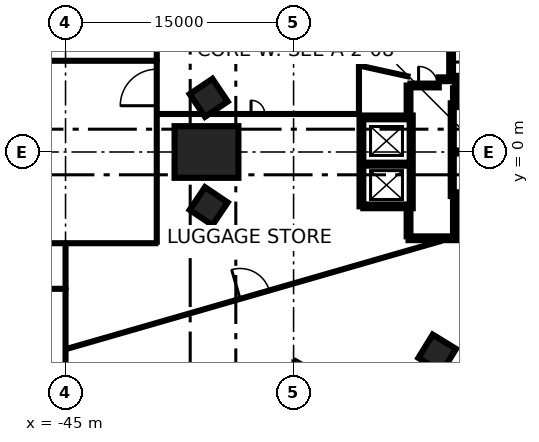
"""IFC4 building model, lengths in metres.
Left out: names, types, materials, properties, quantities, classifications, styles, units other than length and angle.
Written with IfcOpenShell. Run it as: python <this file> out.ifc"""

import sys

from ifc_helpers import new_model, si_unit, direction, frame, frame_2d, origin, origin_2d, place, context, subcontext, project, spatial, rectangle, extrude, element, fill, save


model = new_model("IFC4")
c1 = context("Model", 3, precision=1e-05, world=origin(), true_north=direction((0.0, 1.0)))
c2 = subcontext(c1, "Body", "Model", "MODEL_VIEW")
j1 = project(units=[si_unit("LENGTHUNIT", "METRE"), si_unit("PLANEANGLEUNIT", "RADIAN")], contexts=[c1])
p1 = place(None, origin())
s1 = spatial("IfcSite", under=j1, at=p1, CompositionType="ELEMENT")
p2 = place(p1, origin())
s2 = spatial("IfcBuilding", under=s1, at=p2, CompositionType="ELEMENT")
p3 = place(p2, origin())
s3 = spatial("IfcBuildingStorey", under=s2, at=p3, CompositionType="ELEMENT", Elevation=0.0)
p4 = place(p3, frame((-35.729, 0.0, -0.45), z_axis=(0.0, 0.0, 1.0), x_axis=(1.0, 0.0, 0.0)))
e1 = element("IfcColumn", 1, at=p4, inside=s3, PredefinedType="COLUMN", context=c2, shape_type="SweptSolid", body=[
    extrude(rectangle(XDim=4.2, YDim=3.4, at=origin_2d()), origin(), (0.0, 0.0, 1.0), 7.55),
])
for number, where, z_axis, x_axis in (
    (2, (-35.583, 3.565, -0.45), (0.0, 0.0, 1.0), (-0.559, 0.829, 0.0)),
    (3, (-35.583, -3.565, -0.45), (0.0, 0.0, 1.0), (0.559, 0.829, 0.0)),
    (4, (-20.552, -13.248, -0.45), (0.0, 0.0, 1.0), (0.523, 0.852, 0.0)),
):
    element("IfcColumn", number, at=place(p3, frame(where, z_axis=z_axis, x_axis=x_axis)), inside=s3, PredefinedType="COLUMN", context=c2, shape_type="SweptSolid", body=[
        extrude(rectangle(XDim=1.8, YDim=1.8, at=origin_2d()), origin(), (0.0, 0.0, 1.0), 5.15),
    ])
p5 = place(p3, frame((-25.983, -16.031, 0.0), z_axis=(0.0, 0.0, 1.0), x_axis=(-0.866023543838, 0.500003221507, 0.0)))
e5 = element("IfcWall", 5, at=p5, inside=s3, PredefinedType="SOLIDWALL", context=c2, shape_type="SweptSolid", body=[
    extrude(rectangle(XDim=4.566, YDim=0.25, at=frame_2d((2.283, 0.0))), origin(), (0.0, 0.0, 1.0), 7.1),
])
p6 = place(p3, frame((-16.187, -5.675, 0.0), z_axis=(0.0, 0.0, 1.0), x_axis=(-1.0, 0.0, 0.0)))
e6 = element("IfcWall", 6, at=p6, inside=s3, PredefinedType="SHEAR", context=c2, shape_type="SweptSolid", body=[
    extrude(rectangle(XDim=6.25, YDim=0.25, at=frame_2d((3.125, 0.0))), origin(), (0.0, 0.0, 1.0), 7.1),
])
p7 = place(p3, frame((-25.537, -3.575, 0.0), z_axis=(0.0, 0.0, 1.0), x_axis=(0.0, 1.0, 0.0)))
e7 = element("IfcWall", 7, at=p7, inside=s3, PredefinedType="SHEAR", context=c2, shape_type="SweptSolid", body=[
    extrude(rectangle(XDim=5.85, YDim=0.25, at=frame_2d((2.925, 0.0))), origin(), (0.0, 0.0, 1.0), 7.1),
])
p8 = place(p3, frame((-19.387, 3.075, 0.0), z_axis=(0.0, 0.0, 1.0), x_axis=(1.0, 0.0, 0.0)))
e8 = element("IfcWall", 8, at=p8, inside=s3, PredefinedType="SHEAR", context=c2, shape_type="SweptSolid", body=[
    extrude(rectangle(XDim=3.2, YDim=0.25, at=frame_2d((1.6, 0.0))), origin(), (0.0, 0.0, 1.0), 7.1),
])
for number, where, z_axis, x_axis in (
    (9, (-22.437, -3.575, 0.0), (0.0, 0.0, 1.0), (-1.0, 0.0, 0.0)),
    (10, (-25.412, 2.275, 0.0), (0.0, 0.0, 1.0), (1.0, 0.0, 0.0)),
):
    element("IfcWall", number, at=place(p3, frame(where, z_axis=z_axis, x_axis=x_axis)), inside=s3, PredefinedType="SHEAR", context=c2, shape_type="SweptSolid", body=[
        extrude(rectangle(XDim=2.975, YDim=0.25, at=frame_2d((1.487, 0.0))), origin(), (0.0, 0.0, 1.0), 7.1),
    ])
p9 = place(p3, frame((-19.637, 4.785, 0.0), z_axis=(0.0, 0.0, 1.0), x_axis=(0.0, 1.0, 0.0)))
e11 = element("IfcWall", 11, at=p9, inside=s3, PredefinedType="SHEAR", context=c2, shape_type="SweptSolid", body=[
    extrude(rectangle(XDim=2.865, YDim=0.25, at=frame_2d((1.432, 0.0))), origin(), (0.0, 0.0, 1.0), 7.1),
])
p10 = place(p3, frame((-16.302, 4.315, 0.0), z_axis=(0.0, 0.0, 1.0), x_axis=(-1.0, 0.0, 0.0)))
e12 = element("IfcWall", 12, at=p10, inside=s3, PredefinedType="SHEAR", context=c2, shape_type="SweptSolid", body=[
    extrude(rectangle(XDim=3.085, YDim=0.25, at=frame_2d((1.542, 0.0))), origin(), (0.0, 0.0, 1.0), 7.1),
])
p11 = place(p3, frame((-22.437, 2.4, 0.0), z_axis=(0.0, 0.0, 1.0), x_axis=(0.0, 1.0, 0.0)))
e13 = element("IfcWall", 13, at=p11, inside=s3, PredefinedType="SHEAR", context=c2, shape_type="SweptSolid", body=[
    extrude(rectangle(XDim=1.975, YDim=0.25, at=frame_2d((0.987, 0.0))), origin(), (0.0, 0.0, 1.0), 7.1),
])
p12 = place(p3, frame((-22.437, -5.55, 0.0), z_axis=(0.0, 0.0, 1.0), x_axis=(0.0, 1.0, 0.0)))
e14 = element("IfcWall", 14, at=p12, inside=s3, PredefinedType="SHEAR", context=c2, shape_type="SweptSolid", body=[
    extrude(rectangle(XDim=1.849, YDim=0.25, at=frame_2d((0.925, 0.0))), origin(), (0.0, 0.0, 1.0), 7.1),
])
p13 = place(p3, frame((-22.312, 4.375, 0.0), z_axis=(0.0, 0.0, 1.0), x_axis=(1.0, 0.0, 0.0)))
e15 = element("IfcWall", 15, at=p13, inside=s3, PredefinedType="SHEAR", context=c2, shape_type="SweptSolid", body=[
    extrude(rectangle(XDim=1.865, YDim=0.25, at=frame_2d((0.932, 0.0))), origin(), (0.0, 0.0, 1.0), 7.1),
])
p14 = place(p13, frame((0.535, 0.0, 0.0)))
e16 = element("IfcOpeningElement", 16, at=p14, cuts=e15, PredefinedType="OPENING", context=c2, shape_type="SweptSolid", body=[
    extrude(rectangle(XDim=1.25, YDim=2.1, at=frame_2d((0.625, 1.05))), frame((0.0, 0.135, 0.0), z_axis=(0.0, -1.0, 0.0), x_axis=(1.0, 0.0, 0.0)), (0.0, 0.0, 1.0), 0.27),
])
p15 = place(p3, frame((-19.387, 4.19, 0.0), z_axis=(0.0, 0.0, 1.0), x_axis=(0.0, -1.0, 0.0)))
e17 = element("IfcWall", 17, at=p15, inside=s3, PredefinedType="SHEAR", context=c2, shape_type="SweptSolid", body=[
    extrude(rectangle(XDim=0.989, YDim=0.25, at=frame_2d((0.495, 0.0))), origin(), (0.0, 0.0, 1.0), 7.1),
])
p16 = place(p3, frame((-20.447, 4.785, 0.0), z_axis=(0.0, 0.0, 1.0), x_axis=(1.0, 0.0, 0.0)))
e18 = element("IfcWall", 18, at=p16, inside=s3, PredefinedType="SHEAR", context=c2, shape_type="SweptSolid", body=[
    extrude(rectangle(XDim=0.685, YDim=0.25, at=frame_2d((0.342, 0.0))), origin(), (0.0, 0.0, 1.0), 7.1),
])
p17 = place(p3, frame((-19.562, -2.9, 0.0), z_axis=(0.0, 0.0, 1.0), x_axis=(0.0, 1.0, 0.0)))
e19 = element("IfcWall", 19, at=p17, inside=s3, PredefinedType="SHEAR", context=c2, shape_type="SweptSolid", body=[
    extrude(rectangle(XDim=6.1, YDim=0.2, at=frame_2d((3.05, 0.0))), origin(), (0.0, 0.0, 1.0), 7.1),
])
p18 = place(p17, frame((3.95, 0.0, 0.0)))
e20 = element("IfcOpeningElement", 20, at=p18, cuts=e19, PredefinedType="OPENING", context=c2, shape_type="SweptSolid", body=[
    extrude(rectangle(XDim=1.1, YDim=2.1, at=frame_2d((0.55, 1.05))), frame((0.0, 0.11, 0.0), z_axis=(0.0, -1.0, 0.0), x_axis=(1.0, 0.0, 0.0)), (0.0, 0.0, 1.0), 0.22),
])
p19 = place(p17, frame((0.968, 0.0, 0.0)))
e21 = element("IfcOpeningElement", 21, at=p19, cuts=e19, PredefinedType="OPENING", context=c2, shape_type="SweptSolid", body=[
    extrude(rectangle(XDim=1.1, YDim=2.1, at=frame_2d((0.55, 1.05))), frame((0.0, 0.11, 0.0), z_axis=(0.0, -1.0, 0.0), x_axis=(1.0, 0.0, 0.0)), (0.0, 0.0, 1.0), 0.22),
])
p20 = place(p3, frame((-22.262, 2.4, 0.0), z_axis=(0.0, 0.0, 1.0), x_axis=(0.0, -1.0, 0.0)))
e22 = element("IfcWall", 22, at=p20, inside=s3, PredefinedType="SHEAR", context=c2, shape_type="SweptSolid", body=[
    extrude(rectangle(XDim=6.1, YDim=0.2, at=frame_2d((3.05, 0.0))), origin(), (0.0, 0.0, 1.0), 7.1),
])
p21 = place(p20, frame((1.0, 0.0, 0.0)))
e23 = element("IfcOpeningElement", 23, at=p21, cuts=e22, PredefinedType="OPENING", context=c2, shape_type="SweptSolid", body=[
    extrude(rectangle(XDim=1.2, YDim=2.1, at=frame_2d((0.6, 1.05))), frame((0.0, 0.11, 0.0), z_axis=(0.0, -1.0, 0.0), x_axis=(1.0, 0.0, 0.0)), (0.0, 0.0, 1.0), 0.22),
])
p22 = place(p20, frame((4.05, 0.0, 0.0)))
e24 = element("IfcOpeningElement", 24, at=p22, cuts=e22, PredefinedType="OPENING", context=c2, shape_type="SweptSolid", body=[
    extrude(rectangle(XDim=1.2, YDim=2.1, at=frame_2d((0.6, 1.05))), frame((0.0, 0.11, 0.0), z_axis=(0.0, -1.0, 0.0), x_axis=(1.0, 0.0, 0.0)), (0.0, 0.0, 1.0), 0.22),
])
p23 = place(p3, frame((-16.263, 0.0, 0.0), z_axis=(0.0, 0.0, 1.0), x_axis=(-1.0, 0.0, 0.0)))
e25 = element("IfcWall", 25, at=p23, inside=s3, PredefinedType="SHEAR", context=c2, shape_type="SweptSolid", body=[
    extrude(rectangle(XDim=3.198, YDim=0.2, at=frame_2d((1.599, 0.0))), origin(), (0.0, 0.0, 1.0), 7.1),
])
p24 = place(p3, frame((-22.363, -0.8, 0.0), z_axis=(0.0, 0.0, 1.0), x_axis=(-1.0, 0.0, 0.0)))
e26 = element("IfcWall", 26, at=p24, inside=s3, PredefinedType="SHEAR", context=c2, shape_type="SweptSolid", body=[
    extrude(rectangle(XDim=3.048, YDim=0.2, at=frame_2d((1.524, 0.0))), origin(), (0.0, 0.0, 1.0), 7.1),
])
p25 = place(p3, frame((-19.511, 4.91, 0.0), z_axis=(0.0, 0.0, 1.0), x_axis=(1.0, 0.0, 0.0)))
e27 = element("IfcWall", 27, at=p25, inside=s3, PredefinedType="SHEAR", context=c2, shape_type="SweptSolid", body=[
    extrude(rectangle(XDim=2.798, YDim=0.2, at=frame_2d((1.399, 0.0))), origin(), (0.0, 0.0, 1.0), 7.1),
])
p26 = place(p25, frame((0.949, 0.0, 0.0)))
e28 = element("IfcOpeningElement", 28, at=p26, cuts=e27, PredefinedType="OPENING", context=c2, shape_type="SweptSolid", body=[
    extrude(rectangle(XDim=0.9, YDim=2.1, at=frame_2d((0.45, 1.05))), frame((0.0, 0.11, 0.0), z_axis=(0.0, -1.0, 0.0), x_axis=(1.0, 0.0, 0.0)), (0.0, 0.0, 1.0), 0.22),
])
p27 = place(p3, frame((-19.412, -2.75, 0.0), z_axis=(0.0, 0.0, 1.0), x_axis=(1.0, 0.0, 0.0)))
e29 = element("IfcWall", 29, at=p27, inside=s3, PredefinedType="SHEAR", context=c2, shape_type="SweptSolid", body=[
    extrude(rectangle(XDim=3.1, YDim=0.2, at=frame_2d((1.55, 0.0))), origin(), (0.0, 0.0, 1.0), 7.1),
])
p28 = place(p3, frame((-19.412, -5.549, 0.0), z_axis=(0.0, 0.0, 1.0), x_axis=(0.0, 1.0, 0.0)))
e30 = element("IfcWall", 30, at=p28, inside=s3, PredefinedType="SHEAR", context=c2, shape_type="SweptSolid", body=[
    extrude(rectangle(XDim=2.651, YDim=0.2, at=frame_2d((1.325, 0.0))), origin(), (0.0, 0.0, 1.0), 7.1),
])
p29 = place(p3, frame((-89.095, -6.0, 0.0), z_axis=(0.0, 0.0, 1.0), x_axis=(1.0, 0.0, 0.0)))
e31 = element("IfcWall", 31, at=p29, inside=s3, PredefinedType="PARTITIONING", context=c2, shape_type="SweptSolid", body=[
    extrude(rectangle(XDim=44.107, YDim=0.2, at=frame_2d((22.053, 0.0))), origin(), (0.0, 0.0, 1.0), 7.1),
])
p30 = place(p29, frame((23.596, 0.0, 0.0)))
e32 = element("IfcOpeningElement", 32, at=p30, cuts=e31, PredefinedType="OPENING", context=c2, shape_type="SweptSolid", body=[
    extrude(rectangle(XDim=2.4, YDim=2.1, at=frame_2d((1.2, 1.05))), frame((0.0, 0.11, 0.0), z_axis=(0.0, -1.0, 0.0), x_axis=(1.0, 0.0, 0.0)), (0.0, 0.0, 1.0), 0.22),
])
p31 = place(p29, frame((1.601, 0.0, 0.0)))
e33 = element("IfcOpeningElement", 33, at=p31, cuts=e31, PredefinedType="OPENING", context=c2, shape_type="SweptSolid", body=[
    extrude(rectangle(XDim=2.4, YDim=2.1, at=frame_2d((1.2, 1.05))), frame((0.0, 0.11, 0.0), z_axis=(0.0, -1.0, 0.0), x_axis=(1.0, 0.0, 0.0)), (0.0, 0.0, 1.0), 0.22),
])
p32 = place(p3, frame((-83.598, -9.0, 0.0), z_axis=(0.0, 0.0, 1.0), x_axis=(1.0, 0.0, 0.0)))
e34 = element("IfcWall", 34, at=p32, inside=s3, PredefinedType="PARTITIONING", context=c2, shape_type="SweptSolid", body=[
    extrude(rectangle(XDim=38.598, YDim=0.2, at=frame_2d((19.299, 0.0))), origin(), (0.0, 0.0, 1.0), 7.1),
])
p33 = place(p32, frame((15.649, 0.0, 0.0)))
e35 = element("IfcOpeningElement", 35, at=p33, cuts=e34, PredefinedType="OPENING", context=c2, shape_type="SweptSolid", body=[
    extrude(rectangle(XDim=0.9, YDim=2.1, at=frame_2d((0.45, 1.05))), frame((0.0, 0.11, 0.0), z_axis=(0.0, -1.0, 0.0), x_axis=(1.0, 0.0, 0.0)), (0.0, 0.0, 1.0), 0.22),
])
p34 = place(p32, frame((30.093, 0.0, 0.0)))
e36 = element("IfcOpeningElement", 36, at=p34, cuts=e34, PredefinedType="OPENING", context=c2, shape_type="SweptSolid", body=[
    extrude(rectangle(XDim=2.0, YDim=2.1, at=frame_2d((1.0, 1.05))), frame((0.0, 0.11, 0.0), z_axis=(0.0, -1.0, 0.0), x_axis=(1.0, 0.0, 0.0)), (0.0, 0.0, 1.0), 0.22),
])
p35 = place(p3, frame((-45.0, -9.0, 0.0), z_axis=(0.0, 0.0, 1.0), x_axis=(0.0, 1.0, 0.0)))
e37 = element("IfcWall", 37, at=p35, inside=s3, PredefinedType="PARTITIONING", context=c2, shape_type="SweptSolid", body=[
    extrude(rectangle(XDim=2.998, YDim=0.2, at=frame_2d((1.499, 0.0))), origin(), (0.0, 0.0, 1.0), 7.1),
])
p36 = place(p3, frame((-83.61, 6.0, 0.0), z_axis=(0.0, 0.0, 1.0), x_axis=(1.0, 0.0, 0.0)))
e38 = element("IfcWall", 38, at=p36, inside=s3, PredefinedType="PARTITIONING", context=c2, shape_type="SweptSolid", body=[
    extrude(rectangle(XDim=44.61, YDim=0.2, at=frame_2d((22.305, 0.0))), origin(), (0.0, 0.0, 1.0), 7.1),
])
p37 = place(p36, frame((25.605, 0.0, 0.0)))
e39 = element("IfcOpeningElement", 39, at=p37, cuts=e38, PredefinedType="OPENING", context=c2, shape_type="SweptSolid", body=[
    extrude(rectangle(XDim=2.0, YDim=2.1, at=frame_2d((1.0, 1.05))), frame((0.0, 0.11, 0.0), z_axis=(0.0, -1.0, 0.0), x_axis=(1.0, 0.0, 0.0)), (0.0, 0.0, 1.0), 0.22),
])
p38 = place(p3, frame((-45.01, -6.0, 0.0), z_axis=(0.0, 0.0, 1.0), x_axis=(1.0, 0.0, 0.0)))
e40 = element("IfcWall", 40, at=p38, inside=s3, PredefinedType="PARTITIONING", context=c2, shape_type="SweptSolid", body=[
    extrude(rectangle(XDim=6.01, YDim=0.2, at=frame_2d((3.005, 0.0))), origin(), (0.0, 0.0, 1.0), 7.1),
])
p39 = place(p3, frame((-45.0, -31.995, 0.0), z_axis=(0.0, 0.0, 1.0), x_axis=(0.0, 1.0, 0.0)))
e41 = element("IfcWall", 41, at=p39, inside=s3, PredefinedType="PARTITIONING", context=c2, shape_type="SweptSolid", body=[
    extrude(rectangle(XDim=22.993, YDim=0.2, at=frame_2d((11.497, 0.0))), origin(), (0.0, 0.0, 1.0), 7.1),
])
p40 = place(p3, frame((-44.998, -12.972, 0.0), z_axis=(0.0, 0.0, 1.0), x_axis=(0.960873245647, 0.27698845788, 0.0)))
e42 = element("IfcWall", 42, at=p40, inside=s3, PredefinedType="PARTITIONING", context=c2, shape_type="SweptSolid", body=[
    extrude(rectangle(XDim=25.676, YDim=0.2, at=frame_2d((12.838, 0.0))), origin(), (0.0, 0.0, 1.0), 4.7),
])
p41 = place(p40, frame((11.946, 0.0, 0.0)))
e43 = element("IfcOpeningElement", 43, at=p41, cuts=e42, PredefinedType="OPENING", context=c2, shape_type="SweptSolid", body=[
    extrude(rectangle(XDim=2.0, YDim=2.1, at=frame_2d((1.0, 1.05))), frame((0.0, 0.11, 0.0), z_axis=(0.0, -1.0, 0.0), x_axis=(1.0, 0.0, 0.0)), (0.0, 0.0, 1.0), 0.22),
])
p42 = place(p3, frame((-39.0, -6.0, 0.0), z_axis=(0.0, 0.0, 1.0), x_axis=(0.0, 1.0, 0.0)))
e44 = element("IfcWall", 44, at=p42, inside=s3, PredefinedType="PARTITIONING", context=c2, shape_type="SweptSolid", body=[
    extrude(rectangle(XDim=12.0, YDim=0.2, at=frame_2d((6.0, 0.0))), origin(), (0.0, 0.0, 1.0), 7.1),
])
p43 = place(p42, frame((9.044, 0.0, 0.0)))
e45 = element("IfcOpeningElement", 45, at=p43, cuts=e44, PredefinedType="OPENING", context=c2, shape_type="SweptSolid", body=[
    extrude(rectangle(XDim=2.4, YDim=2.1, at=frame_2d((1.2, 1.05))), frame((0.0, 0.11, 0.0), z_axis=(0.0, -1.0, 0.0), x_axis=(1.0, 0.0, 0.0)), (0.0, 0.0, 1.0), 0.22),
])
p44 = place(p3, frame((-39.0, 11.397, 0.0), z_axis=(0.0, 0.0, 1.0), x_axis=(0.000181011853, -0.999999983617, 0.0)))
e46 = element("IfcWall", 46, at=p44, inside=s3, PredefinedType="PARTITIONING", context=c2, shape_type="SweptSolid", body=[
    extrude(rectangle(XDim=5.395, YDim=0.2, at=frame_2d((2.698, 0.0))), origin(), (0.0, 0.0, 1.0), 7.1),
])
p45 = place(p3, frame((-38.998, 2.5, 0.0), z_axis=(0.0, 0.0, 1.0), x_axis=(1.0, 0.0, 0.0)))
e47 = element("IfcWall", 47, at=p45, inside=s3, PredefinedType="PARTITIONING", context=c2, shape_type="SweptSolid", body=[
    extrude(rectangle(XDim=13.298, YDim=0.2, at=frame_2d((6.649, 0.0))), origin(), (0.0, 0.0, 1.0), 7.1),
])
p46 = place(p45, frame((6.199, 0.0, 0.0)))
e48 = element("IfcOpeningElement", 48, at=p46, cuts=e47, PredefinedType="OPENING", context=c2, shape_type="SweptSolid", body=[
    extrude(rectangle(XDim=0.9, YDim=2.1, at=frame_2d((0.45, 1.05))), frame((0.0, 0.11, 0.0), z_axis=(0.0, -1.0, 0.0), x_axis=(1.0, 0.0, 0.0)), (0.0, 0.0, 1.0), 0.22),
])
p47 = place(p3, frame((-25.7, 2.5, 0.0), z_axis=(0.0, 0.0, 1.0), x_axis=(0.0, 1.0, 0.0)))
e49 = element("IfcWall", 49, at=p47, inside=s3, PredefinedType="PARTITIONING", context=c2, shape_type="SweptSolid", body=[
    extrude(rectangle(XDim=3.187, YDim=0.2, at=frame_2d((1.594, 0.0))), origin(), (0.0, 0.0, 1.0), 7.1),
])
p48 = place(p3, frame((-25.698, 5.689, 0.0), z_axis=(0.0, 0.0, 1.0), x_axis=(0.976357548796, -0.216161830371, 0.0)))
e50 = element("IfcWall", 50, at=p48, inside=s3, PredefinedType="PARTITIONING", context=c2, shape_type="SweptSolid", body=[
    extrude(rectangle(XDim=3.364, YDim=0.2, at=frame_2d((1.682, 0.0))), origin(), (0.0, 0.0, 1.0), 7.1),
])
p49 = place(p18, origin())
e51 = element("IfcDoor", 51, at=p49, inside=s3, OperationType="DOUBLE_DOOR_SLIDING", PredefinedType="DOOR", context=c2, shape_type="SweptSolid", body=[
    extrude(rectangle(XDim=1.1, YDim=2.1, at=frame_2d((0.55, 1.05))), frame((0.0, 0.025, 0.0), z_axis=(0.0, -1.0, 0.0), x_axis=(1.0, 0.0, 0.0)), (0.0, 0.0, 1.0), 0.05),
])
fill(e20, e51)
p50 = place(p19, origin())
e52 = element("IfcDoor", 52, at=p50, inside=s3, OperationType="DOUBLE_DOOR_SLIDING", PredefinedType="DOOR", context=c2, shape_type="SweptSolid", body=[
    extrude(rectangle(XDim=1.1, YDim=2.1, at=frame_2d((0.55, 1.05))), frame((0.0, 0.025, 0.0), z_axis=(0.0, -1.0, 0.0), x_axis=(1.0, 0.0, 0.0)), (0.0, 0.0, 1.0), 0.05),
])
fill(e21, e52)
p51 = place(p21, origin())
e53 = element("IfcDoor", 53, at=p51, inside=s3, OperationType="DOUBLE_DOOR_SLIDING", PredefinedType="DOOR", context=c2, shape_type="SweptSolid", body=[
    extrude(rectangle(XDim=1.2, YDim=2.1, at=frame_2d((0.6, 1.05))), frame((0.0, 0.025, 0.0), z_axis=(0.0, -1.0, 0.0), x_axis=(1.0, 0.0, 0.0)), (0.0, 0.0, 1.0), 0.05),
])
fill(e23, e53)
p52 = place(p22, origin())
e54 = element("IfcDoor", 54, at=p52, inside=s3, OperationType="DOUBLE_DOOR_SLIDING", PredefinedType="DOOR", context=c2, shape_type="SweptSolid", body=[
    extrude(rectangle(XDim=1.2, YDim=2.1, at=frame_2d((0.6, 1.05))), frame((0.0, 0.025, 0.0), z_axis=(0.0, -1.0, 0.0), x_axis=(1.0, 0.0, 0.0)), (0.0, 0.0, 1.0), 0.05),
])
fill(e24, e54)
p53 = place(p14, origin())
e55 = element("IfcDoor", 55, at=p53, inside=s3, OperationType="SINGLE_SWING_LEFT", PredefinedType="DOOR", context=c2, shape_type="SweptSolid", body=[
    extrude(rectangle(XDim=1.25, YDim=2.1, at=frame_2d((0.625, 1.05))), frame((0.0, 0.025, 0.0), z_axis=(0.0, -1.0, 0.0), x_axis=(1.0, 0.0, 0.0)), (0.0, 0.0, 1.0), 0.05),
])
fill(e16, e55)
p54 = place(p46, frame((0.9, 0.0, 0.0), z_axis=(0.0, 0.0, 1.0), x_axis=(-1.0, 0.0, 0.0)))
e56 = element("IfcDoor", 56, at=p54, inside=s3, OperationType="SINGLE_SWING_LEFT", PredefinedType="DOOR", context=c2, shape_type="SweptSolid", body=[
    extrude(rectangle(XDim=0.9, YDim=2.1, at=frame_2d((0.45, 1.05))), frame((0.0, 0.025, 0.0), z_axis=(0.0, -1.0, 0.0), x_axis=(1.0, 0.0, 0.0)), (0.0, 0.0, 1.0), 0.05),
])
fill(e48, e56)
p55 = place(p41, frame((2.0, 0.0, 0.0), z_axis=(0.0, 0.0, 1.0), x_axis=(-1.0, 0.0, 0.0)))
e57 = element("IfcDoor", 57, at=p55, inside=s3, OperationType="DOUBLE_DOOR_SINGLE_SWING", PredefinedType="DOOR", context=c2, shape_type="SweptSolid", body=[
    extrude(rectangle(XDim=2.0, YDim=2.1, at=frame_2d((1.0, 1.05))), frame((0.0, 0.025, 0.0), z_axis=(0.0, -1.0, 0.0), x_axis=(1.0, 0.0, 0.0)), (0.0, 0.0, 1.0), 0.05),
])
fill(e43, e57)
p56 = place(p43, origin())
e58 = element("IfcDoor", 58, at=p56, inside=s3, OperationType="DOUBLE_DOOR_SINGLE_SWING", PredefinedType="DOOR", context=c2, shape_type="SweptSolid", body=[
    extrude(rectangle(XDim=2.4, YDim=2.1, at=frame_2d((1.2, 1.05))), frame((0.0, 0.025, 0.0), z_axis=(0.0, -1.0, 0.0), x_axis=(1.0, 0.0, 0.0)), (0.0, 0.0, 1.0), 0.05),
])
fill(e45, e58)
save(model, sys.argv[1])
